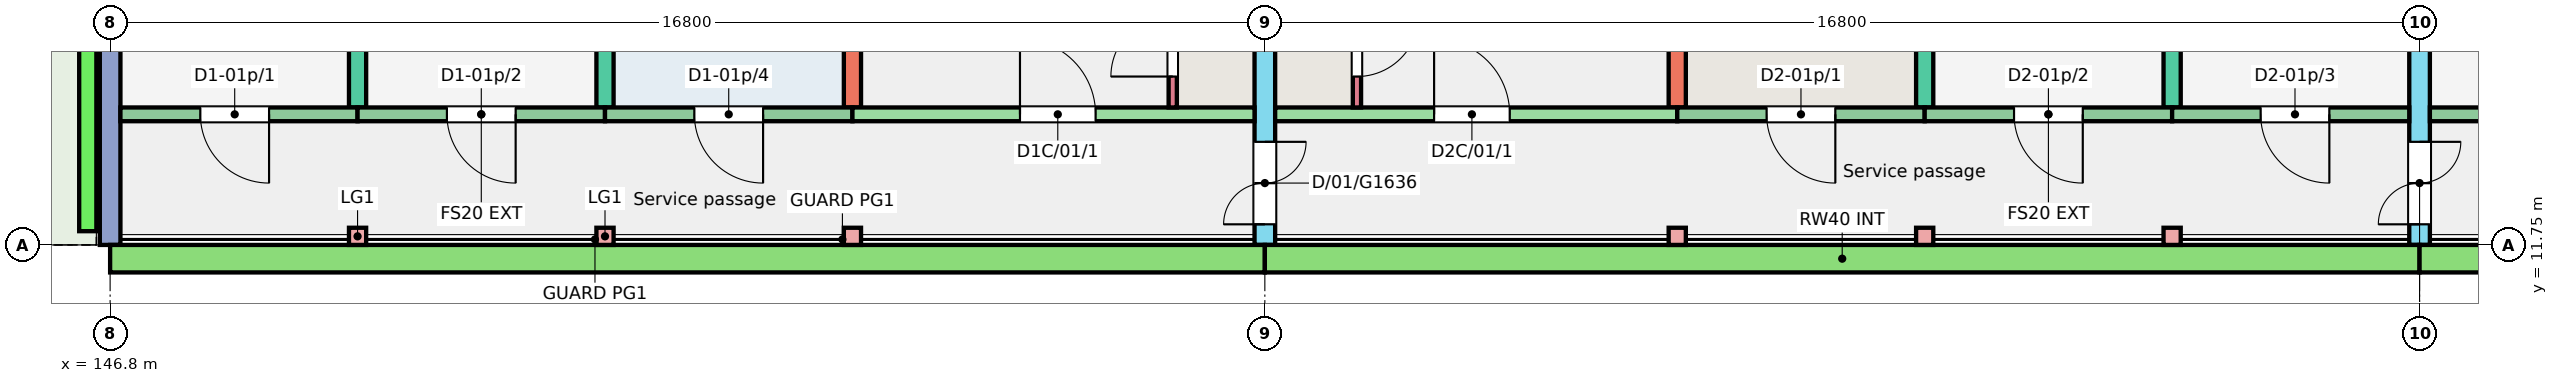
"""IFC4 building model, lengths in metres.
Left out: names, types, materials, properties, quantities, classifications, styles, units other than length and angle.
Written with IfcOpenShell. Run it as: python <this file> out.ifc"""

import sys

from ifc_helpers import new_model, si_unit, direction, frame, frame_2d, origin, origin_2d, place, context, subcontext, project, spatial, rectangle, extrude, element, fill, save


model = new_model("IFC4")
c1 = context("Model", 3, precision=1e-05, world=origin(), true_north=direction((0.0, 1.0)))
c2 = subcontext(c1, "Body", "Model", "MODEL_VIEW")
j1 = project(units=[si_unit("LENGTHUNIT", "METRE"), si_unit("PLANEANGLEUNIT", "RADIAN")], contexts=[c1])
p1 = place(None, origin())
s1 = spatial("IfcSite", under=j1, at=p1, CompositionType="ELEMENT")
p2 = place(p1, origin())
s2 = spatial("IfcBuilding", under=s1, at=p2, CompositionType="ELEMENT")
p3 = place(p2, frame((0.0, 0.0, 3.0)))
s3 = spatial("IfcBuildingStorey", under=s2, at=p3, CompositionType="ELEMENT", Elevation=3.0)
p4 = place(p3, frame((146.8, 11.75, 0.0), z_axis=(0.0, 0.0, 1.0), x_axis=(0.0, 1.0, 0.0)))
e1 = element("IfcWall", 1, at=p4, inside=s3, PredefinedType="SHEAR", context=c2, shape_type="SweptSolid", body=[
    extrude(rectangle(XDim=11.0, YDim=0.3, at=frame_2d((5.5, 0.0))), origin(), (0.0, 0.0, 1.0), 3.0),
])
for number, where, z_axis, x_axis in (
    (2, (150.4, 13.75, 0.0), (0.0, 0.0, 1.0), (0.0, 1.0, 0.0)),
    (3, (154.0, 13.75, 0.0), (0.0, 0.0, 1.0), (0.0, 1.0, 0.0)),
    (4, (157.6, 13.75, 0.0), (0.0, 0.0, 1.0), (0.0, 1.0, 0.0)),
):
    element("IfcWall", number, at=place(p3, frame(where, z_axis=z_axis, x_axis=x_axis)), inside=s3, PredefinedType="SHEAR", context=c2, shape_type="SweptSolid", body=[
        extrude(rectangle(XDim=9.0, YDim=0.25, at=frame_2d((4.5, 0.0))), origin(), (0.0, 0.0, 1.0), 3.0),
    ])
p5 = place(p3, frame((163.6, 11.75, 0.0), z_axis=(0.0, 0.0, 1.0), x_axis=(0.0, 1.0, 0.0)))
e5 = element("IfcWall", 5, at=p5, inside=s3, PredefinedType="SHEAR", context=c2, shape_type="SweptSolid", body=[
    extrude(rectangle(XDim=11.0, YDim=0.3, at=frame_2d((5.5, 0.0))), origin(), (0.0, 0.0, 1.0), 3.0),
])
p6 = place(p5, frame((0.3, 0.0, 0.0)))
e6 = element("IfcOpeningElement", 6, at=p6, cuts=e5, PredefinedType="OPENING", context=c2, shape_type="SweptSolid", body=[
    extrude(rectangle(XDim=1.2, YDim=2.1, at=frame_2d((0.6, 1.05))), frame((0.0, 0.16, 0.0), z_axis=(0.0, -1.0, 0.0), x_axis=(1.0, 0.0, 0.0)), (0.0, 0.0, 1.0), 0.32),
])
for number, where, z_axis, x_axis in (
    (7, (169.6, 13.75, 0.0), (0.0, 0.0, 1.0), (0.0, 1.0, 0.0)),
    (8, (173.2, 13.75, 0.0), (0.0, 0.0, 1.0), (0.0, 1.0, 0.0)),
    (9, (176.8, 13.75, 0.0), (0.0, 0.0, 1.0), (0.0, 1.0, 0.0)),
):
    element("IfcWall", number, at=place(p3, frame(where, z_axis=z_axis, x_axis=x_axis)), inside=s3, PredefinedType="SHEAR", context=c2, shape_type="SweptSolid", body=[
        extrude(rectangle(XDim=9.0, YDim=0.25, at=frame_2d((4.5, 0.0))), origin(), (0.0, 0.0, 1.0), 3.0),
    ])
p7 = place(p3, frame((180.4, 11.75, 0.0), z_axis=(0.0, 0.0, 1.0), x_axis=(0.0, 1.0, 0.0)))
e10 = element("IfcWall", 10, at=p7, inside=s3, PredefinedType="SHEAR", context=c2, shape_type="SweptSolid", body=[
    extrude(rectangle(XDim=11.0, YDim=0.3, at=frame_2d((5.5, 0.0))), origin(), (0.0, 0.0, 1.0), 3.0),
])
p8 = place(p7, frame((0.3, 0.0, 0.0)))
e11 = element("IfcOpeningElement", 11, at=p8, cuts=e10, PredefinedType="OPENING", context=c2, shape_type="SweptSolid", body=[
    extrude(rectangle(XDim=1.2, YDim=2.1, at=frame_2d((0.6, 1.05))), frame((0.0, 0.16, 0.0), z_axis=(0.0, -1.0, 0.0), x_axis=(1.0, 0.0, 0.0)), (0.0, 0.0, 1.0), 0.32),
])
p9 = place(p3, frame((146.95, 13.65, 0.0), z_axis=(0.0, 0.0, 1.0), x_axis=(1.0, 0.0, 0.0)))
e12 = element("IfcWall", 12, at=p9, inside=s3, PredefinedType="SOLIDWALL", context=c2, shape_type="SweptSolid", body=[
    extrude(rectangle(XDim=3.45, YDim=0.2, at=frame_2d((1.725, 0.0))), origin(), (0.0, 0.0, 1.0), 3.0),
])
p10 = place(p9, frame((1.163, 0.0, 0.0)))
e13 = element("IfcOpeningElement", 13, at=p10, cuts=e12, PredefinedType="OPENING", context=c2, shape_type="SweptSolid", body=[
    extrude(rectangle(XDim=1.0, YDim=2.1, at=frame_2d((0.5, 1.05))), frame((0.0, 0.11, 0.0), z_axis=(0.0, -1.0, 0.0), x_axis=(1.0, 0.0, 0.0)), (0.0, 0.0, 1.0), 0.22),
])
p11 = place(p3, frame((150.4, 13.65, 0.0), z_axis=(0.0, 0.0, 1.0), x_axis=(1.0, 0.0, 0.0)))
e14 = element("IfcWall", 14, at=p11, inside=s3, PredefinedType="SOLIDWALL", context=c2, shape_type="SweptSolid", body=[
    extrude(rectangle(XDim=3.6, YDim=0.2, at=frame_2d((1.8, 0.0))), origin(), (0.0, 0.0, 1.0), 3.0),
])
p12 = place(p11, frame((1.3, 0.0, 0.0)))
e15 = element("IfcOpeningElement", 15, at=p12, cuts=e14, PredefinedType="OPENING", context=c2, shape_type="SweptSolid", body=[
    extrude(rectangle(XDim=1.0, YDim=2.1, at=frame_2d((0.5, 1.05))), frame((0.0, 0.11, 0.0), z_axis=(0.0, -1.0, 0.0), x_axis=(1.0, 0.0, 0.0)), (0.0, 0.0, 1.0), 0.22),
])
p13 = place(p3, frame((154.0, 13.65, 0.0), z_axis=(0.0, 0.0, 1.0), x_axis=(1.0, 0.0, 0.0)))
e16 = element("IfcWall", 16, at=p13, inside=s3, PredefinedType="SOLIDWALL", context=c2, shape_type="SweptSolid", body=[
    extrude(rectangle(XDim=3.6, YDim=0.2, at=frame_2d((1.8, 0.0))), origin(), (0.0, 0.0, 1.0), 3.0),
])
p14 = place(p13, frame((1.3, 0.0, 0.0)))
e17 = element("IfcOpeningElement", 17, at=p14, cuts=e16, PredefinedType="OPENING", context=c2, shape_type="SweptSolid", body=[
    extrude(rectangle(XDim=1.0, YDim=2.1, at=frame_2d((0.5, 1.05))), frame((0.0, 0.11, 0.0), z_axis=(0.0, -1.0, 0.0), x_axis=(1.0, 0.0, 0.0)), (0.0, 0.0, 1.0), 0.22),
])
p15 = place(p3, frame((157.6, 13.65, 0.0), z_axis=(0.0, 0.0, 1.0), x_axis=(1.0, 0.0, 0.0)))
e18 = element("IfcWall", 18, at=p15, inside=s3, PredefinedType="SHEAR", context=c2, shape_type="SweptSolid", body=[
    extrude(rectangle(XDim=5.85, YDim=0.2, at=frame_2d((2.925, 0.0))), origin(), (0.0, 0.0, 1.0), 3.0),
])
p16 = place(p15, frame((2.438, 0.0, 0.0)))
e19 = element("IfcOpeningElement", 19, at=p16, cuts=e18, PredefinedType="OPENING", context=c2, shape_type="SweptSolid", body=[
    extrude(rectangle(XDim=1.1, YDim=2.1, at=frame_2d((0.55, 1.05))), frame((0.0, 0.11, 0.0), z_axis=(0.0, -1.0, 0.0), x_axis=(1.0, 0.0, 0.0)), (0.0, 0.0, 1.0), 0.22),
])
p17 = place(p3, frame((162.26, 13.75, 0.0), z_axis=(0.0, 0.0, 1.0), x_axis=(0.0, 1.0, 0.0)))
e20 = element("IfcWall", 20, at=p17, inside=s3, PredefinedType="SHEAR", context=c2, shape_type="SweptSolid", body=[
    extrude(rectangle(XDim=1.72, YDim=0.12, at=frame_2d((0.86, 0.0))), origin(), (0.0, 0.0, 1.0), 3.0),
])
p18 = place(p17, frame((0.45, 0.0, 0.0)))
e21 = element("IfcOpeningElement", 21, at=p18, cuts=e20, PredefinedType="OPENING", context=c2, shape_type="SweptSolid", body=[
    extrude(rectangle(XDim=0.9, YDim=2.1, at=frame_2d((0.45, 1.05))), frame((0.0, 0.07, 0.0), z_axis=(0.0, -1.0, 0.0), x_axis=(1.0, 0.0, 0.0)), (0.0, 0.0, 1.0), 0.14),
])
p19 = place(p3, frame((163.75, 13.65, 0.0), z_axis=(0.0, 0.0, 1.0), x_axis=(1.0, 0.0, 0.0)))
e22 = element("IfcWall", 22, at=p19, inside=s3, PredefinedType="SHEAR", context=c2, shape_type="SweptSolid", body=[
    extrude(rectangle(XDim=5.85, YDim=0.2, at=frame_2d((2.925, 0.0))), origin(), (0.0, 0.0, 1.0), 3.0),
])
p20 = place(p19, frame((2.312, 0.0, 0.0)))
e23 = element("IfcOpeningElement", 23, at=p20, cuts=e22, PredefinedType="OPENING", context=c2, shape_type="SweptSolid", body=[
    extrude(rectangle(XDim=1.1, YDim=2.1, at=frame_2d((0.55, 1.05))), frame((0.0, 0.11, 0.0), z_axis=(0.0, -1.0, 0.0), x_axis=(1.0, 0.0, 0.0)), (0.0, 0.0, 1.0), 0.22),
])
p21 = place(p3, frame((164.94, 13.75, 0.0), z_axis=(0.0, 0.0, 1.0), x_axis=(0.0, 1.0, 0.0)))
e24 = element("IfcWall", 24, at=p21, inside=s3, PredefinedType="SHEAR", context=c2, shape_type="SweptSolid", body=[
    extrude(rectangle(XDim=1.72, YDim=0.12, at=frame_2d((0.86, 0.0))), origin(), (0.0, 0.0, 1.0), 3.0),
])
p22 = place(p21, frame((0.45, 0.0, 0.0)))
e25 = element("IfcOpeningElement", 25, at=p22, cuts=e24, PredefinedType="OPENING", context=c2, shape_type="SweptSolid", body=[
    extrude(rectangle(XDim=0.9, YDim=2.1, at=frame_2d((0.45, 1.05))), frame((0.0, 0.07, 0.0), z_axis=(0.0, -1.0, 0.0), x_axis=(1.0, 0.0, 0.0)), (0.0, 0.0, 1.0), 0.14),
])
p23 = place(p3, frame((169.6, 13.65, 0.0), z_axis=(0.0, 0.0, 1.0), x_axis=(1.0, 0.0, 0.0)))
e26 = element("IfcWall", 26, at=p23, inside=s3, PredefinedType="SOLIDWALL", context=c2, shape_type="SweptSolid", body=[
    extrude(rectangle(XDim=3.6, YDim=0.2, at=frame_2d((1.8, 0.0))), origin(), (0.0, 0.0, 1.0), 3.0),
])
p24 = place(p23, frame((1.3, 0.0, 0.0)))
e27 = element("IfcOpeningElement", 27, at=p24, cuts=e26, PredefinedType="OPENING", context=c2, shape_type="SweptSolid", body=[
    extrude(rectangle(XDim=1.0, YDim=2.1, at=frame_2d((0.5, 1.05))), frame((0.0, 0.11, 0.0), z_axis=(0.0, -1.0, 0.0), x_axis=(1.0, 0.0, 0.0)), (0.0, 0.0, 1.0), 0.22),
])
p25 = place(p3, frame((173.2, 13.65, 0.0), z_axis=(0.0, 0.0, 1.0), x_axis=(1.0, 0.0, 0.0)))
e28 = element("IfcWall", 28, at=p25, inside=s3, PredefinedType="SOLIDWALL", context=c2, shape_type="SweptSolid", body=[
    extrude(rectangle(XDim=3.6, YDim=0.2, at=frame_2d((1.8, 0.0))), origin(), (0.0, 0.0, 1.0), 3.0),
])
p26 = place(p25, frame((1.3, 0.0, 0.0)))
e29 = element("IfcOpeningElement", 29, at=p26, cuts=e28, PredefinedType="OPENING", context=c2, shape_type="SweptSolid", body=[
    extrude(rectangle(XDim=1.0, YDim=2.1, at=frame_2d((0.5, 1.05))), frame((0.0, 0.11, 0.0), z_axis=(0.0, -1.0, 0.0), x_axis=(1.0, 0.0, 0.0)), (0.0, 0.0, 1.0), 0.22),
])
p27 = place(p3, frame((176.8, 13.65, 0.0), z_axis=(0.0, 0.0, 1.0), x_axis=(1.0, 0.0, 0.0)))
e30 = element("IfcWall", 30, at=p27, inside=s3, PredefinedType="SOLIDWALL", context=c2, shape_type="SweptSolid", body=[
    extrude(rectangle(XDim=3.45, YDim=0.2, at=frame_2d((1.725, 0.0))), origin(), (0.0, 0.0, 1.0), 3.0),
])
p28 = place(p27, frame((1.288, 0.0, 0.0)))
e31 = element("IfcOpeningElement", 31, at=p28, cuts=e30, PredefinedType="OPENING", context=c2, shape_type="SweptSolid", body=[
    extrude(rectangle(XDim=1.0, YDim=2.1, at=frame_2d((0.5, 1.05))), frame((0.0, 0.11, 0.0), z_axis=(0.0, -1.0, 0.0), x_axis=(1.0, 0.0, 0.0)), (0.0, 0.0, 1.0), 0.22),
])
p29 = place(p3, frame((180.55, 13.65, 0.0), z_axis=(0.0, 0.0, 1.0), x_axis=(1.0, 0.0, 0.0)))
e32 = element("IfcWall", 32, at=p29, inside=s3, PredefinedType="SOLIDWALL", context=c2, shape_type="SweptSolid", body=[
    extrude(rectangle(XDim=3.45, YDim=0.2, at=frame_2d((1.725, 0.0))), origin(), (0.0, 0.0, 1.0), 3.0),
])
p30 = place(p29, frame((1.163, 0.0, 0.0)))
e33 = element("IfcOpeningElement", 33, at=p30, cuts=e32, PredefinedType="OPENING", context=c2, shape_type="SweptSolid", body=[
    extrude(rectangle(XDim=1.0, YDim=2.1, at=frame_2d((0.5, 1.05))), frame((0.0, 0.11, 0.0), z_axis=(0.0, -1.0, 0.0), x_axis=(1.0, 0.0, 0.0)), (0.0, 0.0, 1.0), 0.22),
])
for number, where, z_axis, x_axis in (
    (34, (150.4, 11.875, 0.0), (0.0, 0.0, 1.0), (1.0, 0.0, 0.0)),
    (35, (154.0, 11.875, 0.0), (0.0, 0.0, 1.0), (1.0, 0.0, 0.0)),
    (36, (157.6, 11.875, 0.0), (0.0, 0.0, 1.0), (1.0, 0.0, 0.0)),
    (37, (169.6, 11.875, 0.0), (0.0, 0.0, 1.0), (1.0, 0.0, 0.0)),
    (38, (173.2, 11.875, 0.0), (0.0, 0.0, 1.0), (1.0, 0.0, 0.0)),
    (39, (176.8, 11.875, 0.0), (0.0, 0.0, 1.0), (1.0, 0.0, 0.0)),
):
    element("IfcColumn", number, at=place(p3, frame(where, z_axis=z_axis, x_axis=x_axis)), inside=s3, PredefinedType="COLUMN", context=c2, shape_type="SweptSolid", body=[
        extrude(rectangle(XDim=0.25, YDim=0.25, at=origin_2d()), origin(), (0.0, 0.0, 1.0), 3.0),
    ])
p31 = place(p3, frame((146.8, 11.55, 0.0), z_axis=(0.0, 0.0, 1.0), x_axis=(1.0, 0.0, 0.0)))
e40 = element("IfcWall", 40, at=p31, inside=s3, PredefinedType="SOLIDWALL", context=c2, shape_type="SweptSolid", body=[
    extrude(rectangle(XDim=16.8, YDim=0.4, at=frame_2d((8.4, 0.0))), origin(), (0.0, 0.0, 1.0), 2.85),
])
p32 = place(p3, frame((163.6, 11.55, 0.0), z_axis=(0.0, 0.0, 1.0), x_axis=(1.0, 0.0, 0.0)))
e41 = element("IfcWall", 41, at=p32, inside=s3, PredefinedType="SOLIDWALL", context=c2, shape_type="SweptSolid", body=[
    extrude(rectangle(XDim=16.8, YDim=0.4, at=frame_2d((8.4, 0.0))), origin(), (0.0, 0.0, 1.0), 2.85),
])
p33 = place(p3, frame((180.4, 11.55, 0.0), z_axis=(0.0, 0.0, 1.0), x_axis=(1.0, 0.0, 0.0)))
e42 = element("IfcWall", 42, at=p33, inside=s3, PredefinedType="SOLIDWALL", context=c2, shape_type="SweptSolid", body=[
    extrude(rectangle(XDim=16.8, YDim=0.4, at=frame_2d((8.4, 0.0))), origin(), (0.0, 0.0, 1.0), 2.85),
])
p34 = place(p2, origin())
s4 = spatial("IfcBuildingStorey", under=s2, at=p34, CompositionType="ELEMENT", Elevation=0.0)
p35 = place(p34, frame((132.8, 11.55, -0.25), z_axis=(0.0, 0.0, 1.0), x_axis=(1.0, 0.0, 0.0)))
e43 = element("IfcWall", 43, at=p35, inside=s4, PredefinedType="SOLIDWALL", context=c2, shape_type="SweptSolid", body=[
    extrude(rectangle(XDim=14.0, YDim=0.4, at=frame_2d((7.0, 0.0))), origin(), (0.0, 0.0, 1.0), 6.25),
])
p36 = place(p3, frame((146.475, 11.95, 0.0), z_axis=(0.0, 0.0, 1.0), x_axis=(0.0, 1.0, 0.0)))
e44 = element("IfcWall", 44, at=p36, inside=s3, PredefinedType="PARAPET", context=c2, shape_type="SweptSolid", body=[
    extrude(rectangle(XDim=10.5, YDim=0.25, at=frame_2d((5.25, 0.0))), origin(), (0.0, 0.0, 1.0), 1.1),
])
p37 = place(p10, origin())
e45 = element("IfcDoor", 45, at=p37, inside=s3, OperationType="SINGLE_SWING_RIGHT", PredefinedType="DOOR", context=c2, shape_type="SweptSolid", body=[
    extrude(rectangle(XDim=1.0, YDim=2.1, at=frame_2d((0.5, 1.05))), frame((0.0, 0.025, 0.0), z_axis=(0.0, -1.0, 0.0), x_axis=(1.0, 0.0, 0.0)), (0.0, 0.0, 1.0), 0.05),
])
fill(e13, e45)
p38 = place(p12, origin())
e46 = element("IfcDoor", 46, at=p38, inside=s3, OperationType="SINGLE_SWING_RIGHT", PredefinedType="DOOR", context=c2, shape_type="SweptSolid", body=[
    extrude(rectangle(XDim=1.0, YDim=2.1, at=frame_2d((0.5, 1.05))), frame((0.0, 0.025, 0.0), z_axis=(0.0, -1.0, 0.0), x_axis=(1.0, 0.0, 0.0)), (0.0, 0.0, 1.0), 0.05),
])
fill(e15, e46)
p39 = place(p14, origin())
e47 = element("IfcDoor", 47, at=p39, inside=s3, OperationType="SINGLE_SWING_RIGHT", PredefinedType="DOOR", context=c2, shape_type="SweptSolid", body=[
    extrude(rectangle(XDim=1.0, YDim=2.1, at=frame_2d((0.5, 1.05))), frame((0.0, 0.025, 0.0), z_axis=(0.0, -1.0, 0.0), x_axis=(1.0, 0.0, 0.0)), (0.0, 0.0, 1.0), 0.05),
])
fill(e17, e47)
p40 = place(p24, origin())
e48 = element("IfcDoor", 48, at=p40, inside=s3, OperationType="SINGLE_SWING_RIGHT", PredefinedType="DOOR", context=c2, shape_type="SweptSolid", body=[
    extrude(rectangle(XDim=1.0, YDim=2.1, at=frame_2d((0.5, 1.05))), frame((0.0, 0.025, 0.0), z_axis=(0.0, -1.0, 0.0), x_axis=(1.0, 0.0, 0.0)), (0.0, 0.0, 1.0), 0.05),
])
fill(e27, e48)
p41 = place(p26, origin())
e49 = element("IfcDoor", 49, at=p41, inside=s3, OperationType="SINGLE_SWING_RIGHT", PredefinedType="DOOR", context=c2, shape_type="SweptSolid", body=[
    extrude(rectangle(XDim=1.0, YDim=2.1, at=frame_2d((0.5, 1.05))), frame((0.0, 0.025, 0.0), z_axis=(0.0, -1.0, 0.0), x_axis=(1.0, 0.0, 0.0)), (0.0, 0.0, 1.0), 0.05),
])
fill(e29, e49)
p42 = place(p28, origin())
e50 = element("IfcDoor", 50, at=p42, inside=s3, OperationType="SINGLE_SWING_RIGHT", PredefinedType="DOOR", context=c2, shape_type="SweptSolid", body=[
    extrude(rectangle(XDim=1.0, YDim=2.1, at=frame_2d((0.5, 1.05))), frame((0.0, 0.025, 0.0), z_axis=(0.0, -1.0, 0.0), x_axis=(1.0, 0.0, 0.0)), (0.0, 0.0, 1.0), 0.05),
])
fill(e31, e50)
p43 = place(p16, origin())
e51 = element("IfcDoor", 51, at=p43, inside=s3, OperationType="SINGLE_SWING_LEFT", PredefinedType="DOOR", context=c2, shape_type="SweptSolid", body=[
    extrude(rectangle(XDim=1.1, YDim=2.1, at=frame_2d((0.55, 1.05))), frame((0.0, 0.025, 0.0), z_axis=(0.0, -1.0, 0.0), x_axis=(1.0, 0.0, 0.0)), (0.0, 0.0, 1.0), 0.05),
])
fill(e19, e51)
p44 = place(p18, origin())
e52 = element("IfcDoor", 52, at=p44, inside=s3, OperationType="SINGLE_SWING_LEFT", PredefinedType="DOOR", context=c2, shape_type="SweptSolid", body=[
    extrude(rectangle(XDim=0.9, YDim=2.1, at=frame_2d((0.45, 1.05))), frame((0.0, 0.025, 0.0), z_axis=(0.0, -1.0, 0.0), x_axis=(1.0, 0.0, 0.0)), (0.0, 0.0, 1.0), 0.05),
])
fill(e21, e52)
p45 = place(p20, origin())
e53 = element("IfcDoor", 53, at=p45, inside=s3, OperationType="SINGLE_SWING_LEFT", PredefinedType="DOOR", context=c2, shape_type="SweptSolid", body=[
    extrude(rectangle(XDim=1.1, YDim=2.1, at=frame_2d((0.55, 1.05))), frame((0.0, 0.025, 0.0), z_axis=(0.0, -1.0, 0.0), x_axis=(1.0, 0.0, 0.0)), (0.0, 0.0, 1.0), 0.05),
])
fill(e23, e53)
p46 = place(p22, origin())
e54 = element("IfcDoor", 54, at=p46, inside=s3, OperationType="SINGLE_SWING_RIGHT", PredefinedType="DOOR", context=c2, shape_type="SweptSolid", body=[
    extrude(rectangle(XDim=0.9, YDim=2.1, at=frame_2d((0.45, 1.05))), frame((0.0, 0.025, 0.0), z_axis=(0.0, -1.0, 0.0), x_axis=(1.0, 0.0, 0.0)), (0.0, 0.0, 1.0), 0.05),
])
fill(e25, e54)
p47 = place(p6, origin())
e55 = element("IfcDoor", 55, at=p47, inside=s3, OperationType="DOUBLE_DOOR_SINGLE_SWING", PredefinedType="DOOR", context=c2, shape_type="SweptSolid", body=[
    extrude(rectangle(XDim=1.2, YDim=2.1, at=frame_2d((0.6, 1.05))), frame((0.0, 0.025, 0.0), z_axis=(0.0, -1.0, 0.0), x_axis=(1.0, 0.0, 0.0)), (0.0, 0.0, 1.0), 0.05),
])
fill(e6, e55)
p48 = place(p8, origin())
e56 = element("IfcDoor", 56, at=p48, inside=s3, OperationType="DOUBLE_DOOR_SINGLE_SWING", PredefinedType="DOOR", context=c2, shape_type="SweptSolid", body=[
    extrude(rectangle(XDim=1.2, YDim=2.1, at=frame_2d((0.6, 1.05))), frame((0.0, 0.025, 0.0), z_axis=(0.0, -1.0, 0.0), x_axis=(1.0, 0.0, 0.0)), (0.0, 0.0, 1.0), 0.05),
])
fill(e11, e56)
save(model, sys.argv[1])
